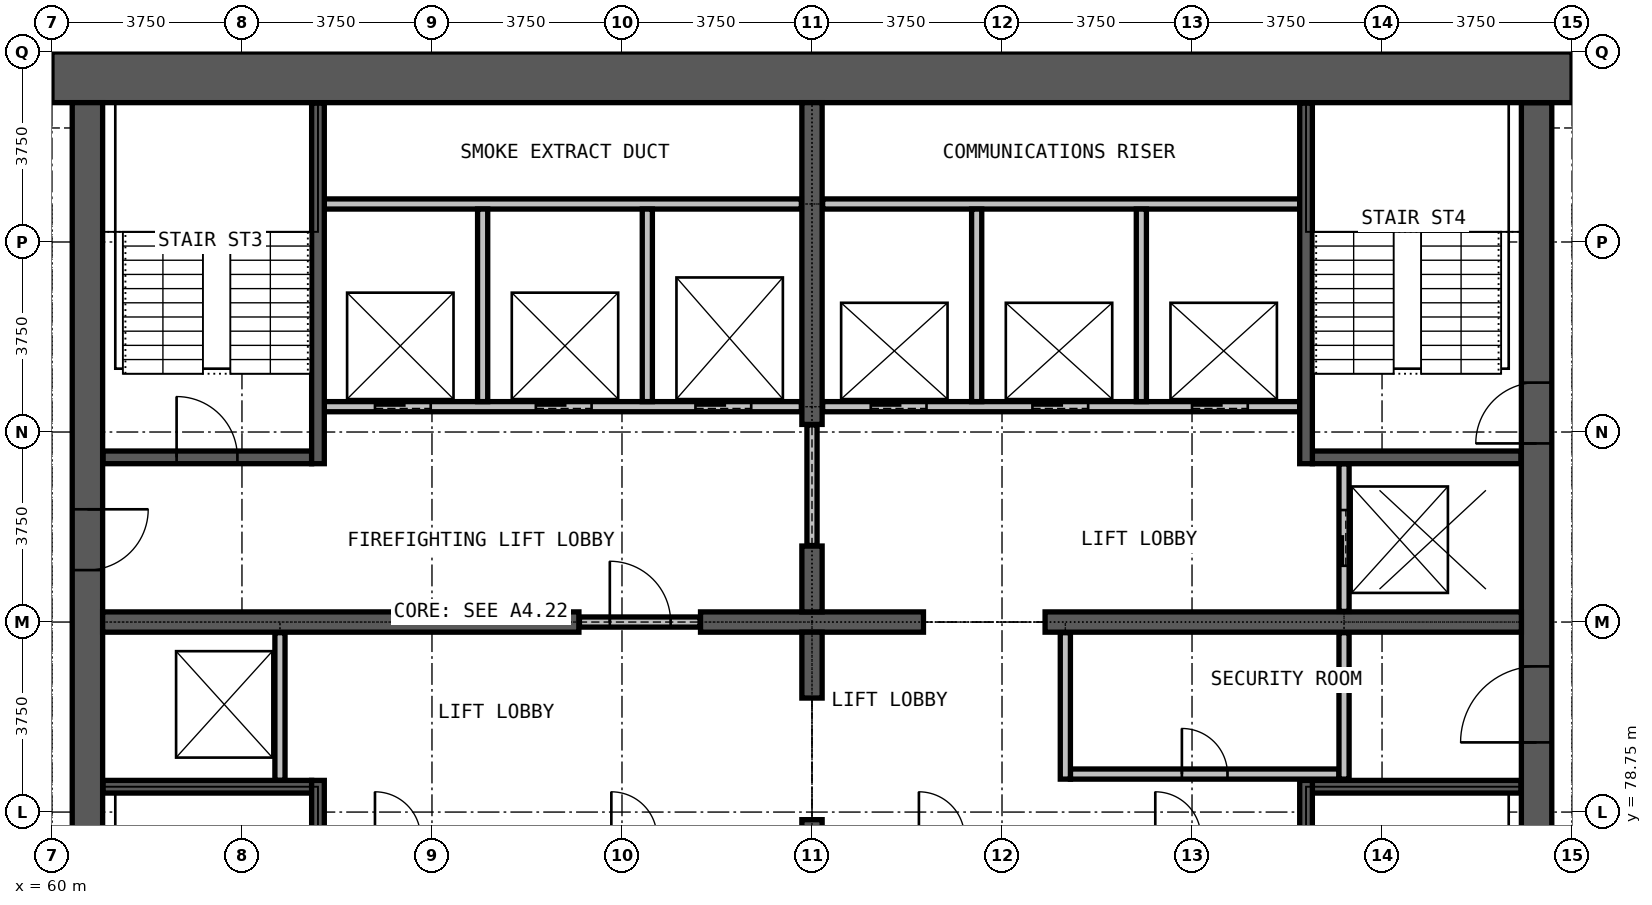
"""IFC4 building model, lengths in metres.
Left out: names, types, materials, properties, quantities, classifications, styles, units other than length and angle.
Written with IfcOpenShell. Run it as: python <this file> out.ifc"""

import sys

from ifc_helpers import new_model, si_unit, direction, frame, frame_2d, origin, place, context, subcontext, project, spatial, rectangle, extrude, element, fill, save


model = new_model("IFC4")
c1 = context("Model", 3, precision=1e-05, world=origin(), true_north=direction((0.0, 1.0)))
c2 = subcontext(c1, "Body", "Model", "MODEL_VIEW")
j1 = project(units=[si_unit("LENGTHUNIT", "METRE"), si_unit("PLANEANGLEUNIT", "RADIAN")], contexts=[c1])
p1 = place(None, origin())
s1 = spatial("IfcSite", under=j1, at=p1, CompositionType="ELEMENT")
p2 = place(p1, origin())
s2 = spatial("IfcBuilding", under=s1, at=p2, CompositionType="ELEMENT")
p3 = place(p2, frame((0.0, 0.0, 242.7)))
s3 = spatial("IfcBuildingStorey", under=s2, at=p3, CompositionType="ELEMENT", Elevation=242.7)
p4 = place(p3, frame((89.3, 72.25, 0.0), z_axis=(0.0, 0.0, 1.0), x_axis=(0.0, 1.0, 0.0)))
e1 = element("IfcWall", 1, at=p4, inside=s3, PredefinedType="SHEAR", context=c2, shape_type="SweptSolid", body=[
    extrude(rectangle(XDim=20.5, YDim=0.6, at=frame_2d((10.25, 0.0))), origin(), (0.0, 0.0, 1.0), 3.6),
])
p5 = place(p4, frame((0.275, 0.0, 0.0)))
e2 = element("IfcOpeningElement", 2, at=p5, cuts=e1, PredefinedType="OPENING", context=c2, shape_type="SweptSolid", body=[
    extrude(rectangle(XDim=1.2, YDim=2.2, at=frame_2d((0.6, 1.1))), frame((0.0, 0.31, 0.0), z_axis=(0.0, -1.0, 0.0), x_axis=(1.0, 0.0, 0.0)), (0.0, 0.0, 1.0), 0.62),
])
p6 = place(p4, frame((13.775, 0.0, 0.0)))
e3 = element("IfcOpeningElement", 3, at=p6, cuts=e1, PredefinedType="OPENING", context=c2, shape_type="SweptSolid", body=[
    extrude(rectangle(XDim=1.2, YDim=2.2, at=frame_2d((0.6, 1.1))), frame((0.0, 0.31, 0.0), z_axis=(0.0, -1.0, 0.0), x_axis=(1.0, 0.0, 0.0)), (0.0, 0.0, 1.0), 0.62),
])
p7 = place(p4, frame((7.875, 0.0, 0.0)))
e4 = element("IfcOpeningElement", 4, at=p7, cuts=e1, PredefinedType="OPENING", context=c2, shape_type="SweptSolid", body=[
    extrude(rectangle(XDim=1.5, YDim=2.2, at=frame_2d((0.75, 1.1))), frame((0.0, 0.31, 0.0), z_axis=(0.0, -1.0, 0.0), x_axis=(1.0, 0.0, 0.0)), (0.0, 0.0, 1.0), 0.62),
])
p8 = place(p3, frame((90.0, 93.25, 0.0), z_axis=(0.0, 0.0, 1.0), x_axis=(-1.0, 0.0, 0.0)))
e5 = element("IfcWall", 5, at=p8, inside=s3, PredefinedType="SHEAR", context=c2, shape_type="SweptSolid", body=[
    extrude(rectangle(XDim=30.0, YDim=1.0, at=frame_2d((15.0, 0.0))), origin(), (0.0, 0.0, 1.0), 3.6),
])
p9 = place(p3, frame((60.7, 92.75, 0.0), z_axis=(0.0, 0.0, 1.0), x_axis=(0.0, -1.0, 0.0)))
e6 = element("IfcWall", 6, at=p9, inside=s3, PredefinedType="SHEAR", context=c2, shape_type="SweptSolid", body=[
    extrude(rectangle(XDim=20.5, YDim=0.6, at=frame_2d((10.25, 0.0))), origin(), (0.0, 0.0, 1.0), 3.6),
])
p10 = place(p9, frame((19.025, 0.0, 0.0)))
e7 = element("IfcOpeningElement", 7, at=p10, cuts=e6, PredefinedType="OPENING", context=c2, shape_type="SweptSolid", body=[
    extrude(rectangle(XDim=1.2, YDim=2.2, at=frame_2d((0.6, 1.1))), frame((0.0, 0.31, 0.0), z_axis=(0.0, -1.0, 0.0), x_axis=(1.0, 0.0, 0.0)), (0.0, 0.0, 1.0), 0.62),
])
p11 = place(p9, frame((8.025, 0.0, 0.0)))
e8 = element("IfcOpeningElement", 8, at=p11, cuts=e6, PredefinedType="OPENING", context=c2, shape_type="SweptSolid", body=[
    extrude(rectangle(XDim=1.2, YDim=2.2, at=frame_2d((0.6, 1.1))), frame((0.0, 0.31, 0.0), z_axis=(0.0, -1.0, 0.0), x_axis=(1.0, 0.0, 0.0)), (0.0, 0.0, 1.0), 0.62),
])
p12 = place(p3, frame((61.0, 82.5, 0.0), z_axis=(0.0, 0.0, 1.0), x_axis=(1.0, 0.0, 0.0)))
e9 = element("IfcWall", 9, at=p12, inside=s3, PredefinedType="SHEAR", context=c2, shape_type="SweptSolid", body=[
    extrude(rectangle(XDim=9.4, YDim=0.4, at=frame_2d((4.7, 0.0))), origin(), (0.0, 0.0, 1.0), 3.6),
])
p13 = place(p3, frame((72.8, 82.5, 0.0), z_axis=(0.0, 0.0, 1.0), x_axis=(1.0, 0.0, 0.0)))
e10 = element("IfcWall", 10, at=p13, inside=s3, PredefinedType="SHEAR", context=c2, shape_type="SweptSolid", body=[
    extrude(rectangle(XDim=4.4, YDim=0.4, at=frame_2d((2.2, 0.0))), origin(), (0.0, 0.0, 1.0), 3.6),
])
p14 = place(p3, frame((79.6, 82.5, 0.0), z_axis=(0.0, 0.0, 1.0), x_axis=(1.0, 0.0, 0.0)))
e11 = element("IfcWall", 11, at=p14, inside=s3, PredefinedType="SHEAR", context=c2, shape_type="SweptSolid", body=[
    extrude(rectangle(XDim=9.4, YDim=0.4, at=frame_2d((4.7, 0.0))), origin(), (0.0, 0.0, 1.0), 3.6),
])
p15 = place(p3, frame((75.0, 72.25, 0.0), z_axis=(0.0, 0.0, 1.0), x_axis=(0.0, 1.0, 0.0)))
e12 = element("IfcWall", 12, at=p15, inside=s3, PredefinedType="SHEAR", context=c2, shape_type="SweptSolid", body=[
    extrude(rectangle(XDim=6.35, YDim=0.4, at=frame_2d((3.175, 0.0))), origin(), (0.0, 0.0, 1.0), 3.6),
])
for number, where, z_axis, x_axis in (
    (13, (75.0, 81.0, 0.0), (0.0, 0.0, 1.0), (0.0, 1.0, 0.0)),
    (14, (75.0, 82.7, 0.0), (0.0, 0.0, 1.0), (0.0, 1.0, 0.0)),
):
    element("IfcWall", number, at=place(p3, frame(where, z_axis=z_axis, x_axis=x_axis)), inside=s3, PredefinedType="SHEAR", context=c2, shape_type="SweptSolid", body=[
        extrude(rectangle(XDim=1.3, YDim=0.4, at=frame_2d((0.65, 0.0))), origin(), (0.0, 0.0, 1.0), 3.6),
    ])
p16 = place(p3, frame((75.0, 86.4, 0.0), z_axis=(0.0, 0.0, 1.0), x_axis=(0.0, 1.0, 0.0)))
e15 = element("IfcWall", 15, at=p16, inside=s3, PredefinedType="SHEAR", context=c2, shape_type="SweptSolid", body=[
    extrude(rectangle(XDim=6.35, YDim=0.4, at=frame_2d((3.175, 0.0))), origin(), (0.0, 0.0, 1.0), 3.6),
])
p17 = place(p3, frame((80.1, 79.5, 0.0), z_axis=(0.0, 0.0, 1.0), x_axis=(1.0, 0.0, 0.0)))
e16 = element("IfcWall", 16, at=p17, inside=s3, PredefinedType="PARTITIONING", context=c2, shape_type="SweptSolid", body=[
    extrude(rectangle(XDim=5.3, YDim=0.2, at=frame_2d((2.65, 0.0))), origin(), (0.0, 0.0, 1.0), 3.3),
])
p18 = place(p17, frame((2.2, 0.0, 0.0)))
e17 = element("IfcOpeningElement", 17, at=p18, cuts=e16, PredefinedType="OPENING", context=c2, shape_type="SweptSolid", body=[
    extrude(rectangle(XDim=0.9, YDim=2.2, at=frame_2d((0.45, 1.1))), frame((0.0, 0.11, 0.0), z_axis=(0.0, -1.0, 0.0), x_axis=(1.0, 0.0, 0.0)), (0.0, 0.0, 1.0), 0.22),
])
p19 = place(p3, frame((70.41, 82.5, 0.0), z_axis=(0.0, 0.0, 1.0), x_axis=(1.0, 0.0, 0.0)))
e18 = element("IfcWall", 18, at=p19, inside=s3, PredefinedType="PARTITIONING", context=c2, shape_type="SweptSolid", body=[
    extrude(rectangle(XDim=2.38, YDim=0.2, at=frame_2d((1.19, 0.0))), origin(), (0.0, 0.0, 1.0), 2.4),
])
p20 = place(p19, frame((0.6, 0.0, 0.0)))
e19 = element("IfcOpeningElement", 19, at=p20, cuts=e18, PredefinedType="OPENING", context=c2, shape_type="SweptSolid", body=[
    extrude(rectangle(XDim=1.2, YDim=2.2, at=frame_2d((0.6, 1.1))), frame((0.0, 0.11, 0.0), z_axis=(0.0, -1.0, 0.0), x_axis=(1.0, 0.0, 0.0)), (0.0, 0.0, 1.0), 0.22),
])
p21 = place(p3, frame((75.0, 84.01, 0.0), z_axis=(0.0, 0.0, 1.0), x_axis=(0.0, 1.0, 0.0)))
e20 = element("IfcWall", 20, at=p21, inside=s3, PredefinedType="PARTITIONING", context=c2, shape_type="SweptSolid", body=[
    extrude(rectangle(XDim=2.38, YDim=0.2, at=frame_2d((1.19, 0.0))), origin(), (0.0, 0.0, 1.0), 2.4),
])
for number, where, z_axis, x_axis in (
    (21, (80.0, 79.4, 0.0), (0.0, 0.0, 1.0), (0.0, 1.0, 0.0)),
    (22, (85.5, 79.4, 0.0), (0.0, 0.0, 1.0), (0.0, 1.0, 0.0)),
):
    element("IfcWall", number, at=place(p3, frame(where, z_axis=z_axis, x_axis=x_axis)), inside=s3, PredefinedType="PARTITIONING", context=c2, shape_type="SweptSolid", body=[
        extrude(rectangle(XDim=2.89, YDim=0.2, at=frame_2d((1.445, 0.0))), origin(), (0.0, 0.0, 1.0), 3.3),
    ])
p22 = place(p3, frame((65.375, 86.75, 0.0), z_axis=(0.0, 0.0, 1.0), x_axis=(1.0, 0.0, 0.0)))
e23 = element("IfcWall", 23, at=p22, inside=s3, PredefinedType="PARTITIONING", context=c2, shape_type="SweptSolid", body=[
    extrude(rectangle(XDim=9.415, YDim=0.2, at=frame_2d((4.708, 0.0))), origin(), (0.0, 0.0, 1.0), 3.3),
])
p23 = place(p22, frame((1.0, 0.0, 0.0)))
e24 = element("IfcOpeningElement", 24, at=p23, cuts=e23, PredefinedType="OPENING", context=c2, shape_type="SweptSolid", body=[
    extrude(rectangle(XDim=1.1, YDim=2.2, at=frame_2d((0.55, 1.1))), frame((0.0, 0.11, 0.0), z_axis=(0.0, -1.0, 0.0), x_axis=(1.0, 0.0, 0.0)), (0.0, 0.0, 1.0), 0.22),
])
p24 = place(p22, frame((4.175, 0.0, 0.0)))
e25 = element("IfcOpeningElement", 25, at=p24, cuts=e23, PredefinedType="OPENING", context=c2, shape_type="SweptSolid", body=[
    extrude(rectangle(XDim=1.1, YDim=2.2, at=frame_2d((0.55, 1.1))), frame((0.0, 0.11, 0.0), z_axis=(0.0, -1.0, 0.0), x_axis=(1.0, 0.0, 0.0)), (0.0, 0.0, 1.0), 0.22),
])
p25 = place(p22, frame((7.325, 0.0, 0.0)))
e26 = element("IfcOpeningElement", 26, at=p25, cuts=e23, PredefinedType="OPENING", context=c2, shape_type="SweptSolid", body=[
    extrude(rectangle(XDim=1.1, YDim=2.2, at=frame_2d((0.55, 1.1))), frame((0.0, 0.11, 0.0), z_axis=(0.0, -1.0, 0.0), x_axis=(1.0, 0.0, 0.0)), (0.0, 0.0, 1.0), 0.22),
])
p26 = place(p3, frame((75.21, 86.75, 0.0), z_axis=(0.0, 0.0, 1.0), x_axis=(1.0, 0.0, 0.0)))
e27 = element("IfcWall", 27, at=p26, inside=s3, PredefinedType="PARTITIONING", context=c2, shape_type="SweptSolid", body=[
    extrude(rectangle(XDim=9.415, YDim=0.2, at=frame_2d((4.708, 0.0))), origin(), (0.0, 0.0, 1.0), 3.3),
])
p27 = place(p26, frame((0.95, 0.0, 0.0)))
e28 = element("IfcOpeningElement", 28, at=p27, cuts=e27, PredefinedType="OPENING", context=c2, shape_type="SweptSolid", body=[
    extrude(rectangle(XDim=1.1, YDim=2.2, at=frame_2d((0.55, 1.1))), frame((0.0, 0.11, 0.0), z_axis=(0.0, -1.0, 0.0), x_axis=(1.0, 0.0, 0.0)), (0.0, 0.0, 1.0), 0.22),
])
p28 = place(p26, frame((4.14, 0.0, 0.0)))
e29 = element("IfcOpeningElement", 29, at=p28, cuts=e27, PredefinedType="OPENING", context=c2, shape_type="SweptSolid", body=[
    extrude(rectangle(XDim=1.1, YDim=2.2, at=frame_2d((0.55, 1.1))), frame((0.0, 0.11, 0.0), z_axis=(0.0, -1.0, 0.0), x_axis=(1.0, 0.0, 0.0)), (0.0, 0.0, 1.0), 0.22),
])
p29 = place(p26, frame((7.29, 0.0, 0.0)))
e30 = element("IfcOpeningElement", 30, at=p29, cuts=e27, PredefinedType="OPENING", context=c2, shape_type="SweptSolid", body=[
    extrude(rectangle(XDim=1.1, YDim=2.2, at=frame_2d((0.55, 1.1))), frame((0.0, 0.11, 0.0), z_axis=(0.0, -1.0, 0.0), x_axis=(1.0, 0.0, 0.0)), (0.0, 0.0, 1.0), 0.22),
])
for number, where, z_axis, x_axis in (
    (31, (65.375, 90.75, 0.0), (0.0, 0.0, 1.0), (1.0, 0.0, 0.0)),
    (32, (75.21, 90.75, 0.0), (0.0, 0.0, 1.0), (1.0, 0.0, 0.0)),
):
    element("IfcWall", number, at=place(p3, frame(where, z_axis=z_axis, x_axis=x_axis)), inside=s3, PredefinedType="PARTITIONING", context=c2, shape_type="SweptSolid", body=[
        extrude(rectangle(XDim=9.415, YDim=0.2, at=frame_2d((4.708, 0.0))), origin(), (0.0, 0.0, 1.0), 3.3),
    ])
p30 = place(p3, frame((64.5, 79.375, 0.0), z_axis=(0.0, 0.0, 1.0), x_axis=(0.0, 1.0, 0.0)))
e33 = element("IfcWall", 33, at=p30, inside=s3, PredefinedType="PARTITIONING", context=c2, shape_type="SweptSolid", body=[
    extrude(rectangle(XDim=2.915, YDim=0.2, at=frame_2d((1.458, 0.0))), origin(), (0.0, 0.0, 1.0), 3.3),
])
for number, where, z_axis, x_axis in (
    (34, (68.5, 86.85, 0.0), (0.0, 0.0, 1.0), (0.0, 1.0, 0.0)),
    (35, (71.75, 86.85, 0.0), (0.0, 0.0, 1.0), (0.0, 1.0, 0.0)),
    (36, (78.25, 86.85, 0.0), (0.0, 0.0, 1.0), (0.0, 1.0, 0.0)),
    (37, (81.5, 86.85, 0.0), (0.0, 0.0, 1.0), (0.0, 1.0, 0.0)),
):
    element("IfcWall", number, at=place(p3, frame(where, z_axis=z_axis, x_axis=x_axis)), inside=s3, PredefinedType="PARTITIONING", context=c2, shape_type="SweptSolid", body=[
        extrude(rectangle(XDim=3.8, YDim=0.2, at=frame_2d((1.9, 0.0))), origin(), (0.0, 0.0, 1.0), 3.3),
    ])
p31 = place(p3, frame((85.5, 82.71, 0.0), z_axis=(0.0, 0.0, 1.0), x_axis=(0.0, 1.0, 0.0)))
e38 = element("IfcWall", 38, at=p31, inside=s3, PredefinedType="PARTITIONING", context=c2, shape_type="SweptSolid", body=[
    extrude(rectangle(XDim=2.915, YDim=0.2, at=frame_2d((1.458, 0.0))), origin(), (0.0, 0.0, 1.0), 3.3),
])
p32 = place(p31, frame((0.9, 0.0, 0.0)))
e39 = element("IfcOpeningElement", 39, at=p32, cuts=e38, PredefinedType="OPENING", context=c2, shape_type="SweptSolid", body=[
    extrude(rectangle(XDim=1.1, YDim=2.2, at=frame_2d((0.55, 1.1))), frame((0.0, 0.11, 0.0), z_axis=(0.0, -1.0, 0.0), x_axis=(1.0, 0.0, 0.0)), (0.0, 0.0, 1.0), 0.22),
])
for number, where, z_axis, x_axis in (
    (40, (61.01, 79.25, 0.0), (0.0, 0.0, 1.0), (1.0, 0.0, 0.0)),
    (41, (84.875, 79.25, 0.0), (0.0, 0.0, 1.0), (1.0, 0.0, 0.0)),
):
    element("IfcWall", number, at=place(p3, frame(where, z_axis=z_axis, x_axis=x_axis)), inside=s3, PredefinedType="PARTITIONING", context=c2, shape_type="SweptSolid", body=[
        extrude(rectangle(XDim=4.115, YDim=0.25, at=frame_2d((2.058, 0.0))), origin(), (0.0, 0.0, 1.0), 3.3),
    ])
p33 = place(p3, frame((61.01, 85.75, 0.0), z_axis=(0.0, 0.0, 1.0), x_axis=(1.0, 0.0, 0.0)))
e42 = element("IfcWall", 42, at=p33, inside=s3, PredefinedType="PARTITIONING", context=c2, shape_type="SweptSolid", body=[
    extrude(rectangle(XDim=4.115, YDim=0.25, at=frame_2d((2.058, 0.0))), origin(), (0.0, 0.0, 1.0), 3.3),
])
p34 = place(p33, frame((1.45, 0.0, 0.0)))
e43 = element("IfcOpeningElement", 43, at=p34, cuts=e42, PredefinedType="OPENING", context=c2, shape_type="SweptSolid", body=[
    extrude(rectangle(XDim=1.2, YDim=2.2, at=frame_2d((0.6, 1.1))), frame((0.0, 0.135, 0.0), z_axis=(0.0, -1.0, 0.0), x_axis=(1.0, 0.0, 0.0)), (0.0, 0.0, 1.0), 0.27),
])
p35 = place(p3, frame((84.875, 85.75, 0.0), z_axis=(0.0, 0.0, 1.0), x_axis=(1.0, 0.0, 0.0)))
e44 = element("IfcWall", 44, at=p35, inside=s3, PredefinedType="PARTITIONING", context=c2, shape_type="SweptSolid", body=[
    extrude(rectangle(XDim=4.115, YDim=0.25, at=frame_2d((2.058, 0.0))), origin(), (0.0, 0.0, 1.0), 3.3),
])
for number, where, z_axis, x_axis in (
    (45, (65.25, 72.26, 0.0), (0.0, 0.0, 1.0), (0.0, 1.0, 0.0)),
    (46, (65.25, 85.625, 0.0), (0.0, 0.0, 1.0), (0.0, 1.0, 0.0)),
    (47, (84.75, 72.26, 0.0), (0.0, 0.0, 1.0), (0.0, 1.0, 0.0)),
    (48, (84.75, 85.625, 0.0), (0.0, 0.0, 1.0), (0.0, 1.0, 0.0)),
):
    element("IfcWall", number, at=place(p3, frame(where, z_axis=z_axis, x_axis=x_axis)), inside=s3, PredefinedType="PARTITIONING", context=c2, shape_type="SweptSolid", body=[
        extrude(rectangle(XDim=7.115, YDim=0.25, at=frame_2d((3.558, 0.0))), origin(), (0.0, 0.0, 1.0), 3.3),
    ])
p36 = place(p27, origin())
e49 = element("IfcDoor", 49, at=p36, inside=s3, OperationType="DOUBLE_DOOR_SLIDING", PredefinedType="DOOR", context=c2, shape_type="SweptSolid", body=[
    extrude(rectangle(XDim=1.1, YDim=2.2, at=frame_2d((0.55, 1.1))), frame((0.0, 0.025, 0.0), z_axis=(0.0, -1.0, 0.0), x_axis=(1.0, 0.0, 0.0)), (0.0, 0.0, 1.0), 0.05),
])
fill(e28, e49)
p37 = place(p28, origin())
e50 = element("IfcDoor", 50, at=p37, inside=s3, OperationType="DOUBLE_DOOR_SLIDING", PredefinedType="DOOR", context=c2, shape_type="SweptSolid", body=[
    extrude(rectangle(XDim=1.1, YDim=2.2, at=frame_2d((0.55, 1.1))), frame((0.0, 0.025, 0.0), z_axis=(0.0, -1.0, 0.0), x_axis=(1.0, 0.0, 0.0)), (0.0, 0.0, 1.0), 0.05),
])
fill(e29, e50)
p38 = place(p29, origin())
e51 = element("IfcDoor", 51, at=p38, inside=s3, OperationType="DOUBLE_DOOR_SLIDING", PredefinedType="DOOR", context=c2, shape_type="SweptSolid", body=[
    extrude(rectangle(XDim=1.1, YDim=2.2, at=frame_2d((0.55, 1.1))), frame((0.0, 0.025, 0.0), z_axis=(0.0, -1.0, 0.0), x_axis=(1.0, 0.0, 0.0)), (0.0, 0.0, 1.0), 0.05),
])
fill(e30, e51)
p39 = place(p23, origin())
e52 = element("IfcDoor", 52, at=p39, inside=s3, OperationType="DOUBLE_DOOR_SLIDING", PredefinedType="DOOR", context=c2, shape_type="SweptSolid", body=[
    extrude(rectangle(XDim=1.1, YDim=2.2, at=frame_2d((0.55, 1.1))), frame((0.0, 0.025, 0.0), z_axis=(0.0, -1.0, 0.0), x_axis=(1.0, 0.0, 0.0)), (0.0, 0.0, 1.0), 0.05),
])
fill(e24, e52)
p40 = place(p24, origin())
e53 = element("IfcDoor", 53, at=p40, inside=s3, OperationType="DOUBLE_DOOR_SLIDING", PredefinedType="DOOR", context=c2, shape_type="SweptSolid", body=[
    extrude(rectangle(XDim=1.1, YDim=2.2, at=frame_2d((0.55, 1.1))), frame((0.0, 0.025, 0.0), z_axis=(0.0, -1.0, 0.0), x_axis=(1.0, 0.0, 0.0)), (0.0, 0.0, 1.0), 0.05),
])
fill(e25, e53)
p41 = place(p25, origin())
e54 = element("IfcDoor", 54, at=p41, inside=s3, OperationType="DOUBLE_DOOR_SLIDING", PredefinedType="DOOR", context=c2, shape_type="SweptSolid", body=[
    extrude(rectangle(XDim=1.1, YDim=2.2, at=frame_2d((0.55, 1.1))), frame((0.0, 0.025, 0.0), z_axis=(0.0, -1.0, 0.0), x_axis=(1.0, 0.0, 0.0)), (0.0, 0.0, 1.0), 0.05),
])
fill(e26, e54)
p42 = place(p32, origin())
e55 = element("IfcDoor", 55, at=p42, inside=s3, OperationType="DOUBLE_DOOR_SLIDING", PredefinedType="DOOR", context=c2, shape_type="SweptSolid", body=[
    extrude(rectangle(XDim=1.1, YDim=2.2, at=frame_2d((0.55, 1.1))), frame((0.0, 0.025, 0.0), z_axis=(0.0, -1.0, 0.0), x_axis=(1.0, 0.0, 0.0)), (0.0, 0.0, 1.0), 0.05),
])
fill(e39, e55)
p43 = place(p20, origin())
e56 = element("IfcDoor", 56, at=p43, inside=s3, OperationType="SINGLE_SWING_LEFT", PredefinedType="DOOR", context=c2, shape_type="SweptSolid", body=[
    extrude(rectangle(XDim=1.2, YDim=2.2, at=frame_2d((0.6, 1.1))), frame((0.0, 0.025, 0.0), z_axis=(0.0, -1.0, 0.0), x_axis=(1.0, 0.0, 0.0)), (0.0, 0.0, 1.0), 0.05),
])
fill(e19, e56)
p44 = place(p34, origin())
e57 = element("IfcDoor", 57, at=p44, inside=s3, OperationType="SINGLE_SWING_LEFT", PredefinedType="DOOR", context=c2, shape_type="SweptSolid", body=[
    extrude(rectangle(XDim=1.2, YDim=2.2, at=frame_2d((0.6, 1.1))), frame((0.0, 0.025, 0.0), z_axis=(0.0, -1.0, 0.0), x_axis=(1.0, 0.0, 0.0)), (0.0, 0.0, 1.0), 0.05),
])
fill(e43, e57)
p45 = place(p6, origin())
e58 = element("IfcDoor", 58, at=p45, inside=s3, OperationType="SINGLE_SWING_LEFT", PredefinedType="DOOR", context=c2, shape_type="SweptSolid", body=[
    extrude(rectangle(XDim=1.2, YDim=2.2, at=frame_2d((0.6, 1.1))), frame((0.0, 0.025, 0.0), z_axis=(0.0, -1.0, 0.0), x_axis=(1.0, 0.0, 0.0)), (0.0, 0.0, 1.0), 0.05),
])
fill(e3, e58)
p46 = place(p7, origin())
e59 = element("IfcDoor", 59, at=p46, inside=s3, OperationType="DOUBLE_DOOR_SINGLE_SWING", PredefinedType="DOOR", context=c2, shape_type="SweptSolid", body=[
    extrude(rectangle(XDim=1.5, YDim=2.2, at=frame_2d((0.75, 1.1))), frame((0.0, 0.025, 0.0), z_axis=(0.0, -1.0, 0.0), x_axis=(1.0, 0.0, 0.0)), (0.0, 0.0, 1.0), 0.05),
])
fill(e4, e59)
p47 = place(p18, origin())
e60 = element("IfcDoor", 60, at=p47, inside=s3, OperationType="SINGLE_SWING_LEFT", PredefinedType="DOOR", context=c2, shape_type="SweptSolid", body=[
    extrude(rectangle(XDim=0.9, YDim=2.2, at=frame_2d((0.45, 1.1))), frame((0.0, 0.025, 0.0), z_axis=(0.0, -1.0, 0.0), x_axis=(1.0, 0.0, 0.0)), (0.0, 0.0, 1.0), 0.05),
])
fill(e17, e60)
p48 = place(p11, origin())
e61 = element("IfcDoor", 61, at=p48, inside=s3, OperationType="SINGLE_SWING_LEFT", PredefinedType="DOOR", context=c2, shape_type="SweptSolid", body=[
    extrude(rectangle(XDim=1.2, YDim=2.2, at=frame_2d((0.6, 1.1))), frame((0.0, 0.025, 0.0), z_axis=(0.0, -1.0, 0.0), x_axis=(1.0, 0.0, 0.0)), (0.0, 0.0, 1.0), 0.05),
])
fill(e8, e61)
save(model, sys.argv[1])
